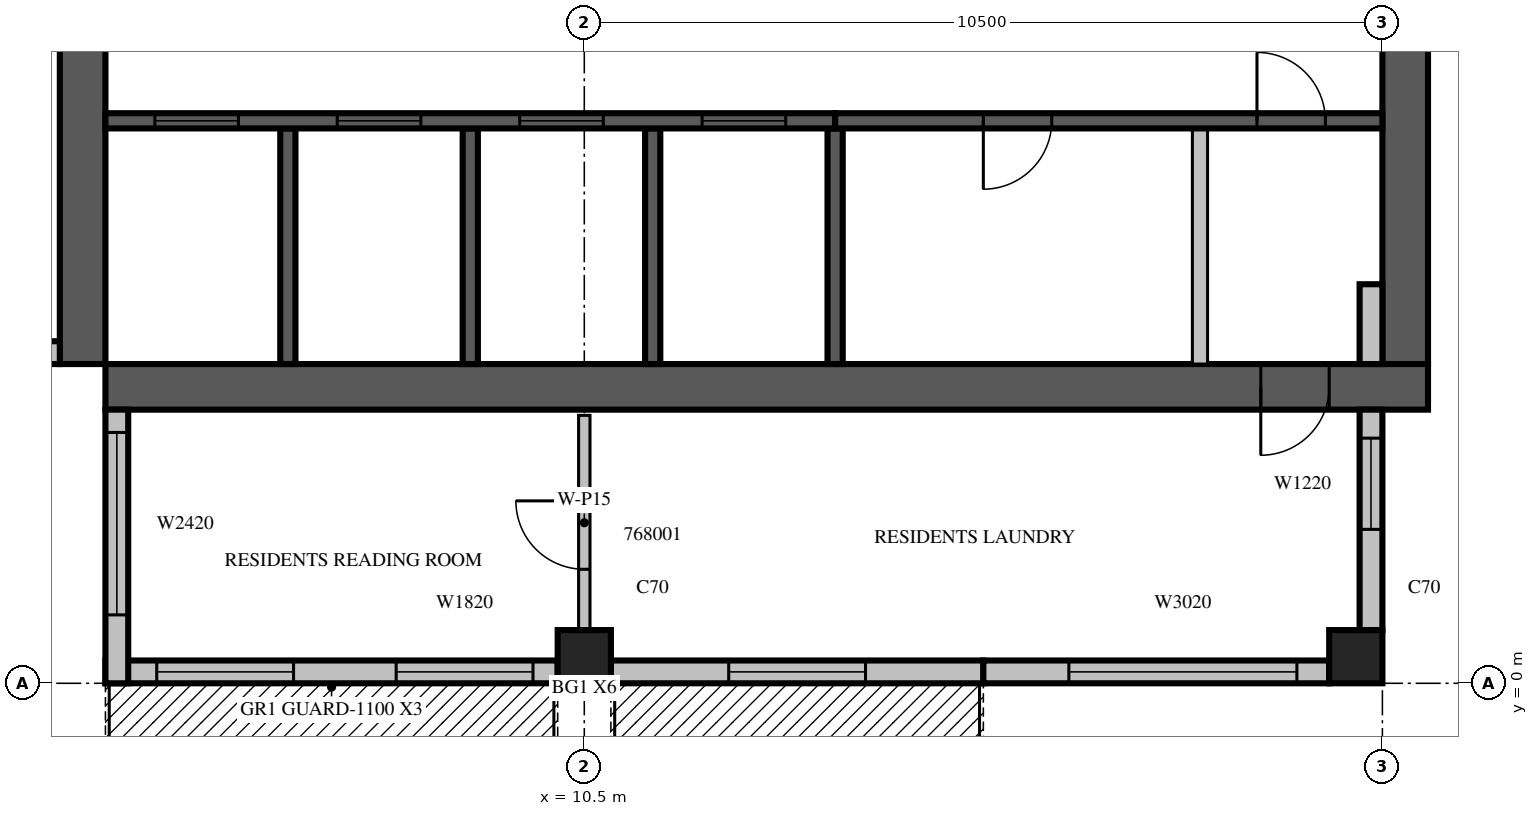
"""IFC4 building model, lengths in metres.
Left out: names, types, materials, properties, quantities, classifications, styles, units other than length and angle.
Written with IfcOpenShell. Run it as: python <this file> out.ifc"""

import sys

from ifc_helpers import new_model, si_unit, direction, frame, frame_2d, origin, origin_2d, place, context, subcontext, project, spatial, rectangle, extrude, source, transform, mapped, element, fill, save


model = new_model("IFC4")
c1 = context("Model", 3, precision=1e-05, world=origin(), true_north=direction((0.0, 1.0)))
c2 = subcontext(c1, "Body", "Model", "MODEL_VIEW")
j1 = project(units=[si_unit("LENGTHUNIT", "METRE"), si_unit("PLANEANGLEUNIT", "RADIAN")], contexts=[c1])
p1 = place(None, origin())
s1 = spatial("IfcSite", under=j1, at=p1, CompositionType="ELEMENT")
p2 = place(p1, origin())
s2 = spatial("IfcBuilding", under=s1, at=p2, CompositionType="ELEMENT")
p3 = place(p2, frame((0.0, 0.0, 298.5)))
s3 = spatial("IfcBuildingStorey", under=s2, at=p3, CompositionType="ELEMENT", Elevation=298.5)
m1 = source(origin(), c2, "Body", "SweptSolid", [
    extrude(rectangle(XDim=0.7, YDim=0.7, at=origin_2d()), origin(), (0.0, 0.0, 1.0), 3.5),
])
for number, where, z_axis, x_axis in (
    (1, (10.5, 0.35, 0.0), (0.0, 0.0, 1.0), (1.0, 0.0, 0.0)),
    (2, (20.65, 0.35, 0.0), (0.0, 0.0, 1.0), (1.0, 0.0, 0.0)),
):
    element("IfcColumn", number, at=place(p3, frame(where, z_axis=z_axis, x_axis=x_axis)), inside=s3, PredefinedType="COLUMN", context=c2, shape_type="MappedRepresentation", body=[
        mapped(m1, transform((0.0, 0.0, 0.0), scale=1.0)),
    ])
m2 = source(origin(), c2, "Body", "SweptSolid", [
    extrude(rectangle(XDim=17.4, YDim=0.6, at=frame_2d((8.7, 0.0))), origin(), (0.0, 0.0, 1.0), 3.5),
])
p4 = place(p3, frame((3.9, 4.2, 0.0), z_axis=(0.0, 0.0, 1.0), x_axis=(0.0, 1.0, 0.0)))
e3 = element("IfcWall", 3, at=p4, inside=s3, PredefinedType="SHEAR", context=c2, shape_type="MappedRepresentation", body=[
    mapped(m2, transform((0.0, 0.0, 0.0), scale=1.0)),
])
m3 = source(origin(), c2, "Body", "SweptSolid", [
    extrude(rectangle(XDim=2.2, YDim=2.1, at=frame_2d((1.1, 1.05))), frame((0.0, 0.31, 0.0), z_axis=(0.0, -1.0, 0.0), x_axis=(1.0, 0.0, 0.0)), (0.0, 0.0, 1.0), 0.62),
])
p5 = place(p4, frame((4.2, 0.0, 0.0)))
e4 = element("IfcOpeningElement", 4, at=p5, cuts=e3, PredefinedType="OPENING", context=c2, shape_type="MappedRepresentation", body=[
    mapped(m3, transform((0.0, 0.0, 0.0), scale=1.0)),
])
m4 = source(origin(), c2, "Body", "SweptSolid", [
    extrude(rectangle(XDim=0.9, YDim=2.1, at=frame_2d((0.45, 1.05))), frame((0.0, 0.31, 0.0), z_axis=(0.0, -1.0, 0.0), x_axis=(1.0, 0.0, 0.0)), (0.0, 0.0, 1.0), 0.62),
])
p6 = place(p4, frame((10.95, 0.0, 0.0)))
e5 = element("IfcOpeningElement", 5, at=p6, cuts=e3, PredefinedType="OPENING", context=c2, shape_type="MappedRepresentation", body=[
    mapped(m4, transform((0.0, 0.0, 0.0), scale=1.0)),
])
m5 = source(origin(), c2, "Body", "SweptSolid", [
    extrude(rectangle(XDim=6.3, YDim=0.6, at=frame_2d((3.15, 0.0))), origin(), (0.0, 0.0, 1.0), 3.5),
])
p7 = place(p3, frame((21.3, 4.2, 0.0), z_axis=(0.0, 0.0, 1.0), x_axis=(0.0, 1.0, 0.0)))
e6 = element("IfcWall", 6, at=p7, inside=s3, PredefinedType="SHEAR", context=c2, shape_type="MappedRepresentation", body=[
    mapped(m5, transform((0.0, 0.0, 0.0), scale=1.0)),
])
p8 = place(p3, frame((4.2, 3.9, 0.0), z_axis=(0.0, 0.0, 1.0), x_axis=(1.0, 0.0, 0.0)))
e7 = element("IfcWall", 7, at=p8, inside=s3, PredefinedType="SHEAR", context=c2, shape_type="MappedRepresentation", body=[
    mapped(m2, transform((0.0, 0.0, 0.0), scale=1.0)),
])
p9 = place(p8, frame((15.2, 0.0, 0.0)))
e8 = element("IfcOpeningElement", 8, at=p9, cuts=e7, PredefinedType="OPENING", context=c2, shape_type="MappedRepresentation", body=[
    mapped(m4, transform((0.0, 0.0, 0.0), scale=1.0)),
])
m6 = source(origin(), c2, "Body", "SweptSolid", [
    extrude(rectangle(XDim=5.95, YDim=0.3, at=frame_2d((2.975, 0.0))), origin(), (0.0, 0.0, 1.0), 3.1),
])
p10 = place(p3, frame((4.2, 0.15, 0.0), z_axis=(0.0, 0.0, 1.0), x_axis=(1.0, 0.0, 0.0)))
e9 = element("IfcWall", 9, at=p10, inside=s3, PredefinedType="STANDARD", context=c2, shape_type="MappedRepresentation", body=[
    mapped(m6, transform((0.0, 0.0, 0.0), scale=1.0)),
])
m7 = source(origin(), c2, "Body", "SweptSolid", [
    extrude(rectangle(XDim=1.8, YDim=2.4, at=frame_2d((0.9, 1.2))), frame((0.0, 0.16, 0.0), z_axis=(0.0, -1.0, 0.0), x_axis=(1.0, 0.0, 0.0)), (0.0, 0.0, 1.0), 0.32),
])
p11 = place(p10, frame((0.675, 0.0, 0.0)))
e10 = element("IfcOpeningElement", 10, at=p11, cuts=e9, PredefinedType="OPENING", context=c2, shape_type="MappedRepresentation", body=[
    mapped(m7, transform((0.0, 0.0, 0.0), scale=1.0)),
])
m8 = source(origin(), c2, "Body", "SweptSolid", [
    extrude(rectangle(XDim=1.8, YDim=2.0, at=frame_2d((0.9, 1.0))), frame((0.0, 0.16, 0.0), z_axis=(0.0, -1.0, 0.0), x_axis=(1.0, 0.0, 0.0)), (0.0, 0.0, 1.0), 0.32),
])
p12 = place(p10, frame((3.825, 0.0, 0.6)))
e11 = element("IfcOpeningElement", 11, at=p12, cuts=e9, PredefinedType="OPENING", context=c2, shape_type="MappedRepresentation", body=[
    mapped(m8, transform((0.0, 0.0, 0.0), scale=1.0)),
])
p13 = place(p3, frame((10.85, 0.15, 0.0), z_axis=(0.0, 0.0, 1.0), x_axis=(1.0, 0.0, 0.0)))
e12 = element("IfcWall", 12, at=p13, inside=s3, PredefinedType="STANDARD", context=c2, shape_type="SweptSolid", body=[
    extrude(rectangle(XDim=4.9, YDim=0.3, at=frame_2d((2.45, 0.0))), origin(), (0.0, 0.0, 1.0), 3.1),
])
p14 = place(p13, frame((1.55, 0.0, 0.0)))
e13 = element("IfcOpeningElement", 13, at=p14, cuts=e12, PredefinedType="OPENING", context=c2, shape_type="MappedRepresentation", body=[
    mapped(m7, transform((0.0, 0.0, 0.0), scale=1.0)),
])
p15 = place(p3, frame((15.75, 0.15, 0.0), z_axis=(0.0, 0.0, 1.0), x_axis=(1.0, 0.0, 0.0)))
e14 = element("IfcWall", 14, at=p15, inside=s3, PredefinedType="STANDARD", context=c2, shape_type="SweptSolid", body=[
    extrude(rectangle(XDim=4.55, YDim=0.3, at=frame_2d((2.275, 0.0))), origin(), (0.0, 0.0, 1.0), 3.1),
])
m9 = source(origin(), c2, "Body", "SweptSolid", [
    extrude(rectangle(XDim=3.0, YDim=2.0, at=frame_2d((1.5, 1.0))), frame((0.0, 0.16, 0.0), z_axis=(0.0, -1.0, 0.0), x_axis=(1.0, 0.0, 0.0)), (0.0, 0.0, 1.0), 0.32),
])
p16 = place(p15, frame((1.125, 0.0, 0.6)))
e15 = element("IfcOpeningElement", 15, at=p16, cuts=e14, PredefinedType="OPENING", context=c2, shape_type="MappedRepresentation", body=[
    mapped(m9, transform((0.0, 0.0, 0.0), scale=1.0)),
])
m10 = source(origin(), c2, "Body", "SweptSolid", [
    extrude(rectangle(XDim=2.9, YDim=0.3, at=frame_2d((1.45, 0.0))), origin(), (0.0, 0.0, 1.0), 3.1),
])
p17 = place(p3, frame((20.85, 0.7, 0.0), z_axis=(0.0, 0.0, 1.0), x_axis=(0.0, 1.0, 0.0)))
e16 = element("IfcWall", 16, at=p17, inside=s3, PredefinedType="STANDARD", context=c2, shape_type="MappedRepresentation", body=[
    mapped(m10, transform((0.0, 0.0, 0.0), scale=1.0)),
])
m11 = source(origin(), c2, "Body", "SweptSolid", [
    extrude(rectangle(XDim=1.2, YDim=2.0, at=frame_2d((0.6, 1.0))), frame((0.0, 0.16, 0.0), z_axis=(0.0, -1.0, 0.0), x_axis=(1.0, 0.0, 0.0)), (0.0, 0.0, 1.0), 0.32),
])
p18 = place(p17, frame((1.325, 0.0, 0.6)))
e17 = element("IfcOpeningElement", 17, at=p18, cuts=e16, PredefinedType="OPENING", context=c2, shape_type="MappedRepresentation", body=[
    mapped(m11, transform((0.0, 0.0, 0.0), scale=1.0)),
])
m12 = source(origin(), c2, "Body", "SweptSolid", [
    extrude(rectangle(XDim=1.05, YDim=0.3, at=frame_2d((0.525, 0.0))), origin(), (0.0, 0.0, 1.0), 3.1),
])
p19 = place(p3, frame((20.85, 4.2, 0.0), z_axis=(0.0, 0.0, 1.0), x_axis=(0.0, 1.0, 0.0)))
e18 = element("IfcWall", 18, at=p19, inside=s3, PredefinedType="STANDARD", context=c2, shape_type="MappedRepresentation", body=[
    mapped(m12, transform((0.0, 0.0, 0.0), scale=1.0)),
])
m13 = source(origin(), c2, "Body", "SweptSolid", [
    extrude(rectangle(XDim=3.6, YDim=0.3, at=frame_2d((1.8, 0.0))), origin(), (0.0, 0.0, 1.0), 3.1),
])
p20 = place(p3, frame((0.0, 4.35, 0.0), z_axis=(0.0, 0.0, 1.0), x_axis=(1.0, 0.0, 0.0)))
e19 = element("IfcWall", 19, at=p20, inside=s3, PredefinedType="STANDARD", context=c2, shape_type="MappedRepresentation", body=[
    mapped(m13, transform((0.0, 0.0, 0.0), scale=1.0)),
])
m14 = source(origin(), c2, "Body", "SweptSolid", [
    extrude(rectangle(XDim=2.4, YDim=2.0, at=frame_2d((1.2, 1.0))), frame((0.0, 0.16, 0.0), z_axis=(0.0, -1.0, 0.0), x_axis=(1.0, 0.0, 0.0)), (0.0, 0.0, 1.0), 0.32),
])
p21 = place(p20, frame((0.9, 0.0, 0.6)))
e20 = element("IfcOpeningElement", 20, at=p21, cuts=e19, PredefinedType="OPENING", context=c2, shape_type="MappedRepresentation", body=[
    mapped(m14, transform((0.0, 0.0, 0.0), scale=1.0)),
])
p22 = place(p3, frame((4.35, 3.6, 0.0), z_axis=(0.0, 0.0, 1.0), x_axis=(0.0, -1.0, 0.0)))
e21 = element("IfcWall", 21, at=p22, inside=s3, PredefinedType="STANDARD", context=c2, shape_type="MappedRepresentation", body=[
    mapped(m13, transform((0.0, 0.0, 0.0), scale=1.0)),
])
p23 = place(p22, frame((0.3, 0.0, 0.6)))
e22 = element("IfcOpeningElement", 22, at=p23, cuts=e21, PredefinedType="OPENING", context=c2, shape_type="MappedRepresentation", body=[
    mapped(m14, transform((0.0, 0.0, 0.0), scale=1.0)),
])
m15 = source(origin(), c2, "Body", "SweptSolid", [
    extrude(rectangle(XDim=3.1, YDim=0.2, at=frame_2d((1.55, 0.0))), origin(), (0.0, 0.0, 1.0), 3.5),
])
for number, where, z_axis, x_axis in (
    (23, (6.6, 4.2, 0.0), (0.0, 0.0, 1.0), (0.0, 1.0, 0.0)),
    (24, (9.0, 4.2, 0.0), (0.0, 0.0, 1.0), (0.0, 1.0, 0.0)),
    (25, (11.4, 4.2, 0.0), (0.0, 0.0, 1.0), (0.0, 1.0, 0.0)),
):
    element("IfcWall", number, at=place(p3, frame(where, z_axis=z_axis, x_axis=x_axis)), inside=s3, PredefinedType="SOLIDWALL", context=c2, shape_type="MappedRepresentation", body=[
        mapped(m15, transform((0.0, 0.0, 0.0), scale=1.0)),
    ])
m16 = source(origin(), c2, "Body", "SweptSolid", [
    extrude(rectangle(XDim=3.1, YDim=0.2, at=frame_2d((1.55, 0.0))), origin(), (0.0, 0.0, 1.0), 3.1),
])
p24 = place(p3, frame((13.8, 4.2, 0.0), z_axis=(0.0, 0.0, 1.0), x_axis=(0.0, 1.0, 0.0)))
e26 = element("IfcWall", 26, at=p24, inside=s3, PredefinedType="SOLIDWALL", context=c2, shape_type="MappedRepresentation", body=[
    mapped(m16, transform((0.0, 0.0, 0.0), scale=1.0)),
])
m17 = source(origin(), c2, "Body", "SweptSolid", [
    extrude(rectangle(XDim=3.1, YDim=0.2, at=frame_2d((1.55, 0.0))), origin(), (0.0, 0.0, 1.0), 3.1),
])
p25 = place(p3, frame((18.6, 4.2, 0.0), z_axis=(0.0, 0.0, 1.0), x_axis=(0.0, 1.0, 0.0)))
e27 = element("IfcWall", 27, at=p25, inside=s3, PredefinedType="PARTITIONING", context=c2, shape_type="MappedRepresentation", body=[
    mapped(m17, transform((0.0, 0.0, 0.0), scale=1.0)),
])
m18 = source(origin(), c2, "Body", "SweptSolid", [
    extrude(rectangle(XDim=9.6, YDim=0.2, at=frame_2d((4.8, 0.0))), origin(), (0.0, 0.0, 1.0), 3.5),
])
p26 = place(p3, frame((4.2, 7.4, 0.0), z_axis=(0.0, 0.0, 1.0), x_axis=(1.0, 0.0, 0.0)))
e28 = element("IfcWall", 28, at=p26, inside=s3, PredefinedType="SOLIDWALL", context=c2, shape_type="MappedRepresentation", body=[
    mapped(m18, transform((0.0, 0.0, 0.0), scale=1.0)),
])
m19 = source(origin(), c2, "Body", "SweptSolid", [
    extrude(rectangle(XDim=1.1, YDim=2.1, at=frame_2d((0.55, 1.05))), frame((0.0, 0.11, 0.0), z_axis=(0.0, -1.0, 0.0), x_axis=(1.0, 0.0, 0.0)), (0.0, 0.0, 1.0), 0.22),
])
p27 = place(p26, frame((0.65, 0.0, 0.0)))
e29 = element("IfcOpeningElement", 29, at=p27, cuts=e28, PredefinedType="OPENING", context=c2, shape_type="MappedRepresentation", body=[
    mapped(m19, transform((0.0, 0.0, 0.0), scale=1.0)),
])
p28 = place(p26, frame((3.05, 0.0, 0.0)))
e30 = element("IfcOpeningElement", 30, at=p28, cuts=e28, PredefinedType="OPENING", context=c2, shape_type="MappedRepresentation", body=[
    mapped(m19, transform((0.0, 0.0, 0.0), scale=1.0)),
])
p29 = place(p26, frame((5.45, 0.0, 0.0)))
e31 = element("IfcOpeningElement", 31, at=p29, cuts=e28, PredefinedType="OPENING", context=c2, shape_type="MappedRepresentation", body=[
    mapped(m19, transform((0.0, 0.0, 0.0), scale=1.0)),
])
p30 = place(p26, frame((7.85, 0.0, 0.0)))
e32 = element("IfcOpeningElement", 32, at=p30, cuts=e28, PredefinedType="OPENING", context=c2, shape_type="MappedRepresentation", body=[
    mapped(m19, transform((0.0, 0.0, 0.0), scale=1.0)),
])
m20 = source(origin(), c2, "Body", "SweptSolid", [
    extrude(rectangle(XDim=7.2, YDim=0.2, at=frame_2d((3.6, 0.0))), origin(), (0.0, 0.0, 1.0), 3.1),
])
p31 = place(p3, frame((13.8, 7.4, 0.0), z_axis=(0.0, 0.0, 1.0), x_axis=(1.0, 0.0, 0.0)))
e33 = element("IfcWall", 33, at=p31, inside=s3, PredefinedType="SOLIDWALL", context=c2, shape_type="MappedRepresentation", body=[
    mapped(m20, transform((0.0, 0.0, 0.0), scale=1.0)),
])
m21 = source(origin(), c2, "Body", "SweptSolid", [
    extrude(rectangle(XDim=0.9, YDim=2.1, at=frame_2d((0.45, 1.05))), frame((0.0, 0.11, 0.0), z_axis=(0.0, -1.0, 0.0), x_axis=(1.0, 0.0, 0.0)), (0.0, 0.0, 1.0), 0.22),
])
p32 = place(p31, frame((1.95, 0.0, 0.0)))
e34 = element("IfcOpeningElement", 34, at=p32, cuts=e33, PredefinedType="OPENING", context=c2, shape_type="MappedRepresentation", body=[
    mapped(m21, transform((0.0, 0.0, 0.0), scale=1.0)),
])
p33 = place(p31, frame((5.55, 0.0, 0.0)))
e35 = element("IfcOpeningElement", 35, at=p33, cuts=e33, PredefinedType="OPENING", context=c2, shape_type="MappedRepresentation", body=[
    mapped(m21, transform((0.0, 0.0, 0.0), scale=1.0)),
])
m22 = source(origin(), c2, "Body", "SweptSolid", [
    extrude(rectangle(XDim=2.826, YDim=0.15, at=frame_2d((1.413, 0.0))), origin(), (0.0, 0.0, 1.0), 3.1),
])
p34 = place(p3, frame((10.5, 3.525, 0.0), z_axis=(0.0, 0.0, 1.0), x_axis=(0.0, -1.0, 0.0)))
e36 = element("IfcWall", 36, at=p34, inside=s3, PredefinedType="PARTITIONING", context=c2, shape_type="MappedRepresentation", body=[
    mapped(m22, transform((0.0, 0.0, 0.0), scale=1.0)),
])
m23 = source(origin(), c2, "Body", "SweptSolid", [
    extrude(rectangle(XDim=0.9, YDim=2.1, at=frame_2d((0.45, 1.05))), frame((0.0, 0.085, 0.0), z_axis=(0.0, -1.0, 0.0), x_axis=(1.0, 0.0, 0.0)), (0.0, 0.0, 1.0), 0.17),
])
p35 = place(p34, frame((1.125, 0.0, 0.0)))
e37 = element("IfcOpeningElement", 37, at=p35, cuts=e36, PredefinedType="OPENING", context=c2, shape_type="MappedRepresentation", body=[
    mapped(m23, transform((0.0, 0.0, 0.0), scale=1.0)),
])
m24 = source(origin(), c2, "Body", "SweptSolid", [
    extrude(rectangle(XDim=1.8, YDim=2.4, at=frame_2d((0.9, 1.2))), frame((0.0, 0.025, 0.0), z_axis=(0.0, -1.0, 0.0), x_axis=(1.0, 0.0, 0.0)), (0.0, 0.0, 1.0), 0.05),
])
p36 = place(p11, origin())
e38 = element("IfcDoor", 38, at=p36, inside=s3, OperationType="SLIDING_TO_LEFT", PredefinedType="DOOR", context=c2, shape_type="MappedRepresentation", body=[
    mapped(m24, transform((0.0, 0.0, 0.0), scale=1.0)),
])
fill(e10, e38)
m25 = source(origin(), c2, "Body", "SweptSolid", [
    extrude(rectangle(XDim=1.8, YDim=2.0, at=frame_2d((0.9, 1.0))), frame((0.0, 0.03, 0.0), z_axis=(0.0, -1.0, 0.0), x_axis=(1.0, 0.0, 0.0)), (0.0, 0.0, 1.0), 0.06),
])
p37 = place(p12, origin())
e39 = element("IfcWindow", 39, at=p37, inside=s3, PartitioningType="SINGLE_PANEL", PredefinedType="WINDOW", context=c2, shape_type="MappedRepresentation", body=[
    mapped(m25, transform((0.0, 0.0, 0.0), scale=1.0)),
])
fill(e11, e39)
p38 = place(p14, origin())
e40 = element("IfcDoor", 40, at=p38, inside=s3, OperationType="SLIDING_TO_LEFT", PredefinedType="DOOR", context=c2, shape_type="MappedRepresentation", body=[
    mapped(m24, transform((0.0, 0.0, 0.0), scale=1.0)),
])
fill(e13, e40)
m26 = source(origin(), c2, "Body", "SweptSolid", [
    extrude(rectangle(XDim=3.0, YDim=2.0, at=frame_2d((1.5, 1.0))), frame((0.0, 0.03, 0.0), z_axis=(0.0, -1.0, 0.0), x_axis=(1.0, 0.0, 0.0)), (0.0, 0.0, 1.0), 0.06),
])
p39 = place(p16, origin())
e41 = element("IfcWindow", 41, at=p39, inside=s3, PartitioningType="SINGLE_PANEL", PredefinedType="WINDOW", context=c2, shape_type="MappedRepresentation", body=[
    mapped(m26, transform((0.0, 0.0, 0.0), scale=1.0)),
])
fill(e15, e41)
m27 = source(origin(), c2, "Body", "SweptSolid", [
    extrude(rectangle(XDim=1.2, YDim=2.0, at=frame_2d((0.6, 1.0))), frame((0.0, 0.03, 0.0), z_axis=(0.0, -1.0, 0.0), x_axis=(1.0, 0.0, 0.0)), (0.0, 0.0, 1.0), 0.06),
])
p40 = place(p18, origin())
e42 = element("IfcWindow", 42, at=p40, inside=s3, PartitioningType="SINGLE_PANEL", PredefinedType="WINDOW", context=c2, shape_type="MappedRepresentation", body=[
    mapped(m27, transform((0.0, 0.0, 0.0), scale=1.0)),
])
fill(e17, e42)
m28 = source(origin(), c2, "Body", "SweptSolid", [
    extrude(rectangle(XDim=2.4, YDim=2.0, at=frame_2d((1.2, 1.0))), frame((0.0, 0.03, 0.0), z_axis=(0.0, -1.0, 0.0), x_axis=(1.0, 0.0, 0.0)), (0.0, 0.0, 1.0), 0.06),
])
p41 = place(p23, origin())
e43 = element("IfcWindow", 43, at=p41, inside=s3, PartitioningType="SINGLE_PANEL", PredefinedType="WINDOW", context=c2, shape_type="MappedRepresentation", body=[
    mapped(m28, transform((0.0, 0.0, 0.0), scale=1.0)),
])
fill(e22, e43)
m29 = source(origin(), c2, "Body", "SweptSolid", [
    extrude(rectangle(XDim=1.1, YDim=2.1, at=frame_2d((0.55, 1.05))), frame((0.0, 0.025, 0.0), z_axis=(0.0, -1.0, 0.0), x_axis=(1.0, 0.0, 0.0)), (0.0, 0.0, 1.0), 0.05),
])
p42 = place(p27, origin())
e44 = element("IfcDoor", 44, at=p42, inside=s3, OperationType="SLIDING_TO_LEFT", PredefinedType="DOOR", context=c2, shape_type="MappedRepresentation", body=[
    mapped(m29, transform((0.0, 0.0, 0.0), scale=1.0)),
])
fill(e29, e44)
p43 = place(p28, origin())
e45 = element("IfcDoor", 45, at=p43, inside=s3, OperationType="SLIDING_TO_LEFT", PredefinedType="DOOR", context=c2, shape_type="MappedRepresentation", body=[
    mapped(m29, transform((0.0, 0.0, 0.0), scale=1.0)),
])
fill(e30, e45)
p44 = place(p29, origin())
e46 = element("IfcDoor", 46, at=p44, inside=s3, OperationType="SLIDING_TO_LEFT", PredefinedType="DOOR", context=c2, shape_type="MappedRepresentation", body=[
    mapped(m29, transform((0.0, 0.0, 0.0), scale=1.0)),
])
fill(e31, e46)
p45 = place(p30, origin())
e47 = element("IfcDoor", 47, at=p45, inside=s3, OperationType="SLIDING_TO_LEFT", PredefinedType="DOOR", context=c2, shape_type="MappedRepresentation", body=[
    mapped(m29, transform((0.0, 0.0, 0.0), scale=1.0)),
])
fill(e32, e47)
m30 = source(origin(), c2, "Body", "SweptSolid", [
    extrude(rectangle(XDim=0.9, YDim=2.1, at=frame_2d((0.45, 1.05))), frame((0.0, 0.025, 0.0), z_axis=(0.0, -1.0, 0.0), x_axis=(1.0, 0.0, 0.0)), (0.0, 0.0, 1.0), 0.05),
])
p46 = place(p32, origin())
e48 = element("IfcDoor", 48, at=p46, inside=s3, OperationType="SINGLE_SWING_RIGHT", PredefinedType="DOOR", context=c2, shape_type="MappedRepresentation", body=[
    mapped(m30, transform((0.0, 0.0, 0.0), scale=1.0)),
])
fill(e34, e48)
p47 = place(p33, origin())
e49 = element("IfcDoor", 49, at=p47, inside=s3, OperationType="SINGLE_SWING_LEFT", PredefinedType="DOOR", context=c2, shape_type="MappedRepresentation", body=[
    mapped(m30, transform((0.0, 0.0, 0.0), scale=1.0)),
])
fill(e35, e49)
p48 = place(p9, origin())
e50 = element("IfcDoor", 50, at=p48, inside=s3, OperationType="SINGLE_SWING_RIGHT", PredefinedType="DOOR", context=c2, shape_type="MappedRepresentation", body=[
    mapped(m30, transform((0.0, 0.0, 0.0), scale=1.0)),
])
fill(e8, e50)
p49 = place(p35, origin())
e51 = element("IfcDoor", 51, at=p49, inside=s3, OperationType="SINGLE_SWING_RIGHT", PredefinedType="DOOR", context=c2, shape_type="MappedRepresentation", body=[
    mapped(m30, transform((0.0, 0.0, 0.0), scale=1.0)),
])
fill(e37, e51)
save(model, sys.argv[1])
